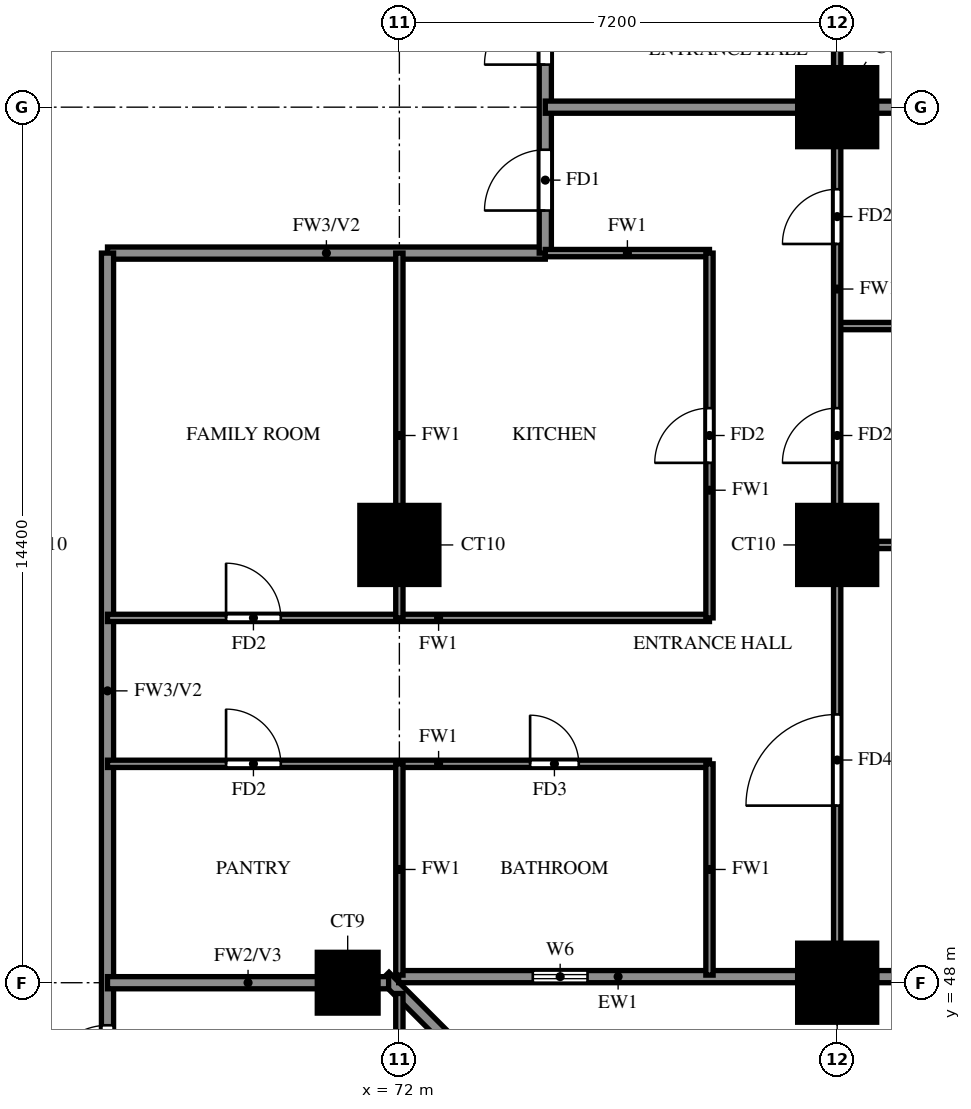
"""IFC4 building model, lengths in metres.
Left out: names, types, materials, properties, quantities, classifications, styles, units other than length and angle.
Written with IfcOpenShell. Run it as: python <this file> out.ifc"""

import sys

from ifc_helpers import new_model, si_unit, direction, frame, frame_2d, origin, origin_2d, place, context, subcontext, project, spatial, rectangle, extrude, source, transform, mapped, element, fill, save


model = new_model("IFC4")
c1 = context("Model", 3, precision=1e-05, world=origin(), true_north=direction((0.0, 1.0)))
c2 = subcontext(c1, "Body", "Model", "MODEL_VIEW")
j1 = project(units=[si_unit("LENGTHUNIT", "METRE"), si_unit("PLANEANGLEUNIT", "RADIAN")], contexts=[c1])
p1 = place(None, origin())
s1 = spatial("IfcSite", under=j1, at=p1, CompositionType="ELEMENT")
p2 = place(p1, origin())
s2 = spatial("IfcBuilding", under=s1, at=p2, CompositionType="ELEMENT")
p3 = place(p2, frame((0.0, 0.0, 76.0)))
s3 = spatial("IfcBuildingStorey", under=s2, at=p3, CompositionType="ELEMENT", Elevation=76.0)
m1 = source(origin(), c2, "Body", "SweptSolid", [
    extrude(rectangle(XDim=1.0, YDim=1.0, at=origin_2d()), origin(), (0.0, 0.0, 1.0), 3.18),
])
p4 = place(p3, frame((71.15, 48.0, 0.0), z_axis=(0.0, 0.0, 1.0), x_axis=(1.0, 0.0, 0.0)))
e1 = element("IfcColumn", 1, at=p4, inside=s3, PredefinedType="COLUMN", context=c2, shape_type="MappedRepresentation", body=[
    mapped(m1, transform((0.0, 0.0, 0.0))),
])
m2 = source(origin(), c2, "Body", "SweptSolid", [
    extrude(rectangle(XDim=1.3, YDim=1.3, at=origin_2d()), origin(), (0.0, 0.0, 1.0), 3.18),
])
for number, where, z_axis, x_axis in (
    (2, (79.2, 48.0, 0.0), (0.0, 0.0, 1.0), (1.0, 0.0, 0.0)),
    (3, (72.0, 55.2, 0.0), (0.0, 0.0, 1.0), (1.0, 0.0, 0.0)),
    (4, (79.2, 55.2, 0.0), (0.0, 0.0, 1.0), (1.0, 0.0, 0.0)),
    (5, (79.2, 62.4, 0.0), (0.0, 0.0, 1.0), (1.0, 0.0, 0.0)),
):
    element("IfcColumn", number, at=place(p3, frame(where, z_axis=z_axis, x_axis=x_axis)), inside=s3, PredefinedType="COLUMN", context=c2, shape_type="MappedRepresentation", body=[
        mapped(m2, transform((0.0, 0.0, 0.0))),
    ])
p5 = place(p3, frame((85.996, 33.863, 0.0), z_axis=(0.0, 0.0, 1.0), x_axis=(-0.707100718496, 0.707112843825, 0.0)))
e6 = element("IfcWall", 6, at=p5, inside=s3, PredefinedType="SOLIDWALL", context=c2, shape_type="SweptSolid", body=[
    extrude(rectangle(XDim=20.135, YDim=0.2, at=frame_2d((10.067, 0.0))), origin(), (0.0, 0.0, 1.0), 3.18),
])
p6 = place(p3, frame((71.989, 48.1, 0.0), z_axis=(0.0, 0.0, 1.0), x_axis=(1.0, 0.0, 0.0)))
e7 = element("IfcWall", 7, at=p6, inside=s3, PredefinedType="SOLIDWALL", context=c2, shape_type="SweptSolid", body=[
    extrude(rectangle(XDim=6.562, YDim=0.2, at=frame_2d((3.281, 0.0))), origin(), (0.0, 0.0, 1.0), 3.18),
])
p7 = place(p6, frame((2.206, 0.0, 1.5)))
e8 = element("IfcOpeningElement", 8, at=p7, cuts=e7, PredefinedType="OPENING", context=c2, shape_type="SweptSolid", body=[
    extrude(rectangle(XDim=0.9, YDim=0.9, at=frame_2d((0.45, 0.45))), frame((0.0, 0.11, 0.0), z_axis=(0.0, -1.0, 0.0), x_axis=(1.0, 0.0, 0.0)), (0.0, 0.0, 1.0), 0.22),
])
p8 = place(p3, frame((79.85, 48.1, 0.0), z_axis=(0.0, 0.0, 1.0), x_axis=(1.0, 0.0, 0.0)))
e9 = element("IfcWall", 9, at=p8, inside=s3, PredefinedType="SOLIDWALL", context=c2, shape_type="SweptSolid", body=[
    extrude(rectangle(XDim=5.45, YDim=0.2, at=frame_2d((2.725, 0.0))), origin(), (0.0, 0.0, 1.0), 3.18),
])
p9 = place(p8, frame((1.525, 0.0, 0.6)))
e10 = element("IfcOpeningElement", 10, at=p9, cuts=e9, PredefinedType="OPENING", context=c2, shape_type="SweptSolid", body=[
    extrude(rectangle(XDim=2.4, YDim=2.4, at=frame_2d((1.2, 1.2))), frame((0.0, 0.11, 0.0), z_axis=(0.0, -1.0, 0.0), x_axis=(1.0, 0.0, 0.0)), (0.0, 0.0, 1.0), 0.22),
])
p10 = place(p3, frame((67.2, 60.0, 0.0), z_axis=(0.0, 0.0, 1.0), x_axis=(1.0, 0.0, 0.0)))
e11 = element("IfcWall", 11, at=p10, inside=s3, PredefinedType="SOLIDWALL", context=c2, shape_type="SweptSolid", body=[
    extrude(rectangle(XDim=7.2, YDim=0.2, at=frame_2d((3.6, 0.0))), origin(), (0.0, 0.0, 1.0), 3.18),
])
p11 = place(p3, frame((67.2, 45.6, 0.0), z_axis=(0.0, 0.0, 1.0), x_axis=(0.0, 1.0, 0.0)))
e12 = element("IfcWall", 12, at=p11, inside=s3, PredefinedType="SOLIDWALL", context=c2, shape_type="SweptSolid", body=[
    extrude(rectangle(XDim=14.4, YDim=0.2, at=frame_2d((7.2, 0.0))), origin(), (0.0, 0.0, 1.0), 3.18),
])
p12 = place(p11, frame((0.7, 0.0, 0.0)))
e13 = element("IfcOpeningElement", 13, at=p12, cuts=e12, PredefinedType="OPENING", context=c2, shape_type="SweptSolid", body=[
    extrude(rectangle(XDim=1.0, YDim=2.1, at=frame_2d((0.5, 1.05))), frame((0.0, 0.11, 0.0), z_axis=(0.0, -1.0, 0.0), x_axis=(1.0, 0.0, 0.0)), (0.0, 0.0, 1.0), 0.22),
])
p13 = place(p3, frame((74.4, 60.0, 0.0), z_axis=(0.0, 0.0, 1.0), x_axis=(0.0, 1.0, 0.0)))
e14 = element("IfcWall", 14, at=p13, inside=s3, PredefinedType="SOLIDWALL", context=c2, shape_type="SweptSolid", body=[
    extrude(rectangle(XDim=9.45, YDim=0.2, at=frame_2d((4.725, 0.0))), origin(), (0.0, 0.0, 1.0), 3.18),
])
p14 = place(p13, frame((0.7, 0.0, 0.0)))
e15 = element("IfcOpeningElement", 15, at=p14, cuts=e14, PredefinedType="OPENING", context=c2, shape_type="SweptSolid", body=[
    extrude(rectangle(XDim=1.0, YDim=2.1, at=frame_2d((0.5, 1.05))), frame((0.0, 0.11, 0.0), z_axis=(0.0, -1.0, 0.0), x_axis=(1.0, 0.0, 0.0)), (0.0, 0.0, 1.0), 0.22),
])
p15 = place(p13, frame((3.1, 0.0, 0.0)))
e16 = element("IfcOpeningElement", 16, at=p15, cuts=e14, PredefinedType="OPENING", context=c2, shape_type="SweptSolid", body=[
    extrude(rectangle(XDim=1.0, YDim=2.1, at=frame_2d((0.5, 1.05))), frame((0.0, 0.11, 0.0), z_axis=(0.0, -1.0, 0.0), x_axis=(1.0, 0.0, 0.0)), (0.0, 0.0, 1.0), 0.22),
])
p16 = place(p3, frame((67.2, 48.0, 0.0), z_axis=(0.0, 0.0, 1.0), x_axis=(1.0, 0.0, 0.0)))
e17 = element("IfcWall", 17, at=p16, inside=s3, PredefinedType="SOLIDWALL", context=c2, shape_type="SweptSolid", body=[
    extrude(rectangle(XDim=4.623, YDim=0.2, at=frame_2d((2.312, 0.0))), origin(), (0.0, 0.0, 1.0), 3.18),
])
p17 = place(p3, frame((74.4, 62.4, 0.0), z_axis=(0.0, 0.0, 1.0), x_axis=(1.0, 0.0, 0.0)))
e18 = element("IfcWall", 18, at=p17, inside=s3, PredefinedType="SOLIDWALL", context=c2, shape_type="SweptSolid", body=[
    extrude(rectangle(XDim=11.875, YDim=0.2, at=frame_2d((5.938, 0.0))), origin(), (0.0, 0.0, 1.0), 3.18),
])
p18 = place(p3, frame((67.2, 51.6, 0.0), z_axis=(0.0, 0.0, 1.0), x_axis=(1.0, 0.0, 0.0)))
e19 = element("IfcWall", 19, at=p18, inside=s3, PredefinedType="PARTITIONING", context=c2, shape_type="SweptSolid", body=[
    extrude(rectangle(XDim=9.9, YDim=0.12, at=frame_2d((4.95, 0.0))), origin(), (0.0, 0.0, 1.0), 3.18),
])
p19 = place(p18, frame((6.95, 0.0, 0.0)))
e20 = element("IfcOpeningElement", 20, at=p19, cuts=e19, PredefinedType="OPENING", context=c2, shape_type="SweptSolid", body=[
    extrude(rectangle(XDim=0.8, YDim=2.1, at=frame_2d((0.4, 1.05))), frame((0.0, 0.07, 0.0), z_axis=(0.0, -1.0, 0.0), x_axis=(1.0, 0.0, 0.0)), (0.0, 0.0, 1.0), 0.14),
])
p20 = place(p18, frame((1.95, 0.0, 0.0)))
e21 = element("IfcOpeningElement", 21, at=p20, cuts=e19, PredefinedType="OPENING", context=c2, shape_type="SweptSolid", body=[
    extrude(rectangle(XDim=0.9, YDim=2.1, at=frame_2d((0.45, 1.05))), frame((0.0, 0.07, 0.0), z_axis=(0.0, -1.0, 0.0), x_axis=(1.0, 0.0, 0.0)), (0.0, 0.0, 1.0), 0.14),
])
p21 = place(p3, frame((67.2, 54.0, 0.0), z_axis=(0.0, 0.0, 1.0), x_axis=(1.0, 0.0, 0.0)))
e22 = element("IfcWall", 22, at=p21, inside=s3, PredefinedType="PARTITIONING", context=c2, shape_type="SweptSolid", body=[
    extrude(rectangle(XDim=9.9, YDim=0.12, at=frame_2d((4.95, 0.0))), origin(), (0.0, 0.0, 1.0), 3.18),
])
p22 = place(p21, frame((1.95, 0.0, 0.0)))
e23 = element("IfcOpeningElement", 23, at=p22, cuts=e22, PredefinedType="OPENING", context=c2, shape_type="SweptSolid", body=[
    extrude(rectangle(XDim=0.9, YDim=2.1, at=frame_2d((0.45, 1.05))), frame((0.0, 0.07, 0.0), z_axis=(0.0, -1.0, 0.0), x_axis=(1.0, 0.0, 0.0)), (0.0, 0.0, 1.0), 0.14),
])
p23 = place(p3, frame((79.2, 55.2, 0.0), z_axis=(0.0, 0.0, 1.0), x_axis=(1.0, 0.0, 0.0)))
e24 = element("IfcWall", 24, at=p23, inside=s3, PredefinedType="PARTITIONING", context=c2, shape_type="SweptSolid", body=[
    extrude(rectangle(XDim=7.075, YDim=0.12, at=frame_2d((3.538, 0.0))), origin(), (0.0, 0.0, 1.0), 3.18),
])
p24 = place(p3, frame((79.2, 58.8, 0.0), z_axis=(0.0, 0.0, 1.0), x_axis=(1.0, 0.0, 0.0)))
e25 = element("IfcWall", 25, at=p24, inside=s3, PredefinedType="PARTITIONING", context=c2, shape_type="SweptSolid", body=[
    extrude(rectangle(XDim=7.075, YDim=0.12, at=frame_2d((3.538, 0.0))), origin(), (0.0, 0.0, 1.0), 2.28),
])
p25 = place(p3, frame((74.4, 60.0, 0.0), z_axis=(0.0, 0.0, 1.0), x_axis=(1.0, 0.0, 0.0)))
e26 = element("IfcWall", 26, at=p25, inside=s3, PredefinedType="PARTITIONING", context=c2, shape_type="SweptSolid", body=[
    extrude(rectangle(XDim=2.7, YDim=0.12, at=frame_2d((1.35, 0.0))), origin(), (0.0, 0.0, 1.0), 3.18),
])
p26 = place(p3, frame((72.0, 33.725, 0.0), z_axis=(0.0, 0.0, 1.0), x_axis=(0.0, 1.0, 0.0)))
e27 = element("IfcWall", 27, at=p26, inside=s3, PredefinedType="PARTITIONING", context=c2, shape_type="SweptSolid", body=[
    extrude(rectangle(XDim=14.098, YDim=0.12, at=frame_2d((7.049, 0.0))), origin(), (0.0, 0.0, 1.0), 2.28),
])
p27 = place(p26, frame((10.075, 0.0, 0.0)))
e28 = element("IfcOpeningElement", 28, at=p27, cuts=e27, PredefinedType="OPENING", context=c2, shape_type="SweptSolid", body=[
    extrude(rectangle(XDim=0.9, YDim=2.1, at=frame_2d((0.45, 1.05))), frame((0.0, 0.07, 0.0), z_axis=(0.0, -1.0, 0.0), x_axis=(1.0, 0.0, 0.0)), (0.0, 0.0, 1.0), 0.14),
])
p28 = place(p3, frame((72.0, 48.125, 0.0), z_axis=(0.0, 0.0, 1.0), x_axis=(0.0, 1.0, 0.0)))
e29 = element("IfcWall", 29, at=p28, inside=s3, PredefinedType="PARTITIONING", context=c2, shape_type="SweptSolid", body=[
    extrude(rectangle(XDim=3.475, YDim=0.12, at=frame_2d((1.738, 0.0))), origin(), (0.0, 0.0, 1.0), 3.18),
])
p29 = place(p3, frame((72.0, 54.0, 0.0), z_axis=(0.0, 0.0, 1.0), x_axis=(0.0, 1.0, 0.0)))
e30 = element("IfcWall", 30, at=p29, inside=s3, PredefinedType="PARTITIONING", context=c2, shape_type="SweptSolid", body=[
    extrude(rectangle(XDim=6.0, YDim=0.12, at=frame_2d((3.0, 0.0))), origin(), (0.0, 0.0, 1.0), 3.18),
])
p30 = place(p3, frame((77.1, 48.125, 0.0), z_axis=(0.0, 0.0, 1.0), x_axis=(0.0, 1.0, 0.0)))
e31 = element("IfcWall", 31, at=p30, inside=s3, PredefinedType="PARTITIONING", context=c2, shape_type="SweptSolid", body=[
    extrude(rectangle(XDim=3.475, YDim=0.12, at=frame_2d((1.738, 0.0))), origin(), (0.0, 0.0, 1.0), 3.18),
])
p31 = place(p3, frame((77.1, 54.0, 0.0), z_axis=(0.0, 0.0, 1.0), x_axis=(0.0, 1.0, 0.0)))
e32 = element("IfcWall", 32, at=p31, inside=s3, PredefinedType="PARTITIONING", context=c2, shape_type="SweptSolid", body=[
    extrude(rectangle(XDim=6.0, YDim=0.12, at=frame_2d((3.0, 0.0))), origin(), (0.0, 0.0, 1.0), 3.18),
])
p32 = place(p31, frame((2.55, 0.0, 0.0)))
e33 = element("IfcOpeningElement", 33, at=p32, cuts=e32, PredefinedType="OPENING", context=c2, shape_type="SweptSolid", body=[
    extrude(rectangle(XDim=0.9, YDim=2.1, at=frame_2d((0.45, 1.05))), frame((0.0, 0.07, 0.0), z_axis=(0.0, -1.0, 0.0), x_axis=(1.0, 0.0, 0.0)), (0.0, 0.0, 1.0), 0.14),
])
p33 = place(p3, frame((79.2, 48.125, 0.0), z_axis=(0.0, 0.0, 1.0), x_axis=(0.0, 1.0, 0.0)))
e34 = element("IfcWall", 34, at=p33, inside=s3, PredefinedType="PARTITIONING", context=c2, shape_type="SweptSolid", body=[
    extrude(rectangle(XDim=25.075, YDim=0.12, at=frame_2d((12.538, 0.0))), origin(), (0.0, 0.0, 1.0), 3.18),
])
p34 = place(p33, frame((2.788, 0.0, 0.0)))
e35 = element("IfcOpeningElement", 35, at=p34, cuts=e34, PredefinedType="OPENING", context=c2, shape_type="SweptSolid", body=[
    extrude(rectangle(XDim=1.5, YDim=2.1, at=frame_2d((0.75, 1.05))), frame((0.0, 0.07, 0.0), z_axis=(0.0, -1.0, 0.0), x_axis=(1.0, 0.0, 0.0)), (0.0, 0.0, 1.0), 0.14),
])
p35 = place(p33, frame((8.425, 0.0, 0.0)))
e36 = element("IfcOpeningElement", 36, at=p35, cuts=e34, PredefinedType="OPENING", context=c2, shape_type="SweptSolid", body=[
    extrude(rectangle(XDim=0.9, YDim=2.1, at=frame_2d((0.45, 1.05))), frame((0.0, 0.07, 0.0), z_axis=(0.0, -1.0, 0.0), x_axis=(1.0, 0.0, 0.0)), (0.0, 0.0, 1.0), 0.14),
])
p36 = place(p33, frame((12.025, 0.0, 0.0)))
e37 = element("IfcOpeningElement", 37, at=p36, cuts=e34, PredefinedType="OPENING", context=c2, shape_type="SweptSolid", body=[
    extrude(rectangle(XDim=0.9, YDim=2.1, at=frame_2d((0.45, 1.05))), frame((0.0, 0.07, 0.0), z_axis=(0.0, -1.0, 0.0), x_axis=(1.0, 0.0, 0.0)), (0.0, 0.0, 1.0), 0.14),
])
p37 = place(p33, frame((15.625, 0.0, 0.0)))
e38 = element("IfcOpeningElement", 38, at=p37, cuts=e34, PredefinedType="OPENING", context=c2, shape_type="SweptSolid", body=[
    extrude(rectangle(XDim=0.9, YDim=2.1, at=frame_2d((0.45, 1.05))), frame((0.0, 0.07, 0.0), z_axis=(0.0, -1.0, 0.0), x_axis=(1.0, 0.0, 0.0)), (0.0, 0.0, 1.0), 0.14),
])
p38 = place(p33, frame((19.225, 0.0, 0.0)))
e39 = element("IfcOpeningElement", 39, at=p38, cuts=e34, PredefinedType="OPENING", context=c2, shape_type="SweptSolid", body=[
    extrude(rectangle(XDim=0.9, YDim=2.1, at=frame_2d((0.45, 1.05))), frame((0.0, 0.07, 0.0), z_axis=(0.0, -1.0, 0.0), x_axis=(1.0, 0.0, 0.0)), (0.0, 0.0, 1.0), 0.14),
])
p39 = place(p33, frame((22.825, 0.0, 0.0)))
e40 = element("IfcOpeningElement", 40, at=p39, cuts=e34, PredefinedType="OPENING", context=c2, shape_type="SweptSolid", body=[
    extrude(rectangle(XDim=0.9, YDim=2.1, at=frame_2d((0.45, 1.05))), frame((0.0, 0.07, 0.0), z_axis=(0.0, -1.0, 0.0), x_axis=(1.0, 0.0, 0.0)), (0.0, 0.0, 1.0), 0.14),
])
p40 = place(p7, origin())
e41 = element("IfcWindow", 41, at=p40, inside=s3, PartitioningType="SINGLE_PANEL", PredefinedType="WINDOW", context=c2, shape_type="SweptSolid", body=[
    extrude(rectangle(XDim=0.9, YDim=0.9, at=frame_2d((0.45, 0.45))), frame((0.0, 0.03, 0.0), z_axis=(0.0, -1.0, 0.0), x_axis=(1.0, 0.0, 0.0)), (0.0, 0.0, 1.0), 0.06),
])
fill(e8, e41)
p41 = place(p14, origin())
e42 = element("IfcDoor", 42, at=p41, inside=s3, OperationType="SINGLE_SWING_RIGHT", PredefinedType="DOOR", context=c2, shape_type="SweptSolid", body=[
    extrude(rectangle(XDim=1.0, YDim=2.1, at=frame_2d((0.5, 1.05))), frame((0.0, 0.025, 0.0), z_axis=(0.0, -1.0, 0.0), x_axis=(1.0, 0.0, 0.0)), (0.0, 0.0, 1.0), 0.05),
])
fill(e15, e42)
p42 = place(p34, origin())
e43 = element("IfcDoor", 43, at=p42, inside=s3, OperationType="SINGLE_SWING_LEFT", PredefinedType="DOOR", context=c2, shape_type="SweptSolid", body=[
    extrude(rectangle(XDim=1.5, YDim=2.1, at=frame_2d((0.75, 1.05))), frame((0.0, 0.025, 0.0), z_axis=(0.0, -1.0, 0.0), x_axis=(1.0, 0.0, 0.0)), (0.0, 0.0, 1.0), 0.05),
])
fill(e35, e43)
p43 = place(p35, origin())
e44 = element("IfcDoor", 44, at=p43, inside=s3, OperationType="SINGLE_SWING_LEFT", PredefinedType="DOOR", context=c2, shape_type="SweptSolid", body=[
    extrude(rectangle(XDim=0.9, YDim=2.1, at=frame_2d((0.45, 1.05))), frame((0.0, 0.025, 0.0), z_axis=(0.0, -1.0, 0.0), x_axis=(1.0, 0.0, 0.0)), (0.0, 0.0, 1.0), 0.05),
])
fill(e36, e44)
p44 = place(p36, origin())
e45 = element("IfcDoor", 45, at=p44, inside=s3, OperationType="SINGLE_SWING_RIGHT", PredefinedType="DOOR", context=c2, shape_type="SweptSolid", body=[
    extrude(rectangle(XDim=0.9, YDim=2.1, at=frame_2d((0.45, 1.05))), frame((0.0, 0.025, 0.0), z_axis=(0.0, -1.0, 0.0), x_axis=(1.0, 0.0, 0.0)), (0.0, 0.0, 1.0), 0.05),
])
fill(e37, e45)
p45 = place(p19, origin())
e46 = element("IfcDoor", 46, at=p45, inside=s3, OperationType="SINGLE_SWING_LEFT", PredefinedType="DOOR", context=c2, shape_type="SweptSolid", body=[
    extrude(rectangle(XDim=0.8, YDim=2.1, at=frame_2d((0.4, 1.05))), frame((0.0, 0.025, 0.0), z_axis=(0.0, -1.0, 0.0), x_axis=(1.0, 0.0, 0.0)), (0.0, 0.0, 1.0), 0.05),
])
fill(e20, e46)
p46 = place(p32, origin())
e47 = element("IfcDoor", 47, at=p46, inside=s3, OperationType="SINGLE_SWING_LEFT", PredefinedType="DOOR", context=c2, shape_type="SweptSolid", body=[
    extrude(rectangle(XDim=0.9, YDim=2.1, at=frame_2d((0.45, 1.05))), frame((0.0, 0.025, 0.0), z_axis=(0.0, -1.0, 0.0), x_axis=(1.0, 0.0, 0.0)), (0.0, 0.0, 1.0), 0.05),
])
fill(e33, e47)
p47 = place(p20, origin())
e48 = element("IfcDoor", 48, at=p47, inside=s3, OperationType="SINGLE_SWING_RIGHT", PredefinedType="DOOR", context=c2, shape_type="SweptSolid", body=[
    extrude(rectangle(XDim=0.9, YDim=2.1, at=frame_2d((0.45, 1.05))), frame((0.0, 0.025, 0.0), z_axis=(0.0, -1.0, 0.0), x_axis=(1.0, 0.0, 0.0)), (0.0, 0.0, 1.0), 0.05),
])
fill(e21, e48)
p48 = place(p22, origin())
e49 = element("IfcDoor", 49, at=p48, inside=s3, OperationType="SINGLE_SWING_LEFT", PredefinedType="DOOR", context=c2, shape_type="SweptSolid", body=[
    extrude(rectangle(XDim=0.9, YDim=2.1, at=frame_2d((0.45, 1.05))), frame((0.0, 0.025, 0.0), z_axis=(0.0, -1.0, 0.0), x_axis=(1.0, 0.0, 0.0)), (0.0, 0.0, 1.0), 0.05),
])
fill(e23, e49)
p49 = place(p15, origin())
e50 = element("IfcDoor", 50, at=p49, inside=s3, OperationType="SINGLE_SWING_RIGHT", PredefinedType="DOOR", context=c2, shape_type="SweptSolid", body=[
    extrude(rectangle(XDim=1.0, YDim=2.1, at=frame_2d((0.5, 1.05))), frame((0.0, 0.025, 0.0), z_axis=(0.0, -1.0, 0.0), x_axis=(1.0, 0.0, 0.0)), (0.0, 0.0, 1.0), 0.05),
])
fill(e16, e50)
p50 = place(p12, origin())
e51 = element("IfcDoor", 51, at=p50, inside=s3, OperationType="SINGLE_SWING_LEFT", PredefinedType="DOOR", context=c2, shape_type="SweptSolid", body=[
    extrude(rectangle(XDim=1.0, YDim=2.1, at=frame_2d((0.5, 1.05))), frame((0.0, 0.025, 0.0), z_axis=(0.0, -1.0, 0.0), x_axis=(1.0, 0.0, 0.0)), (0.0, 0.0, 1.0), 0.05),
])
fill(e13, e51)
save(model, sys.argv[1])
